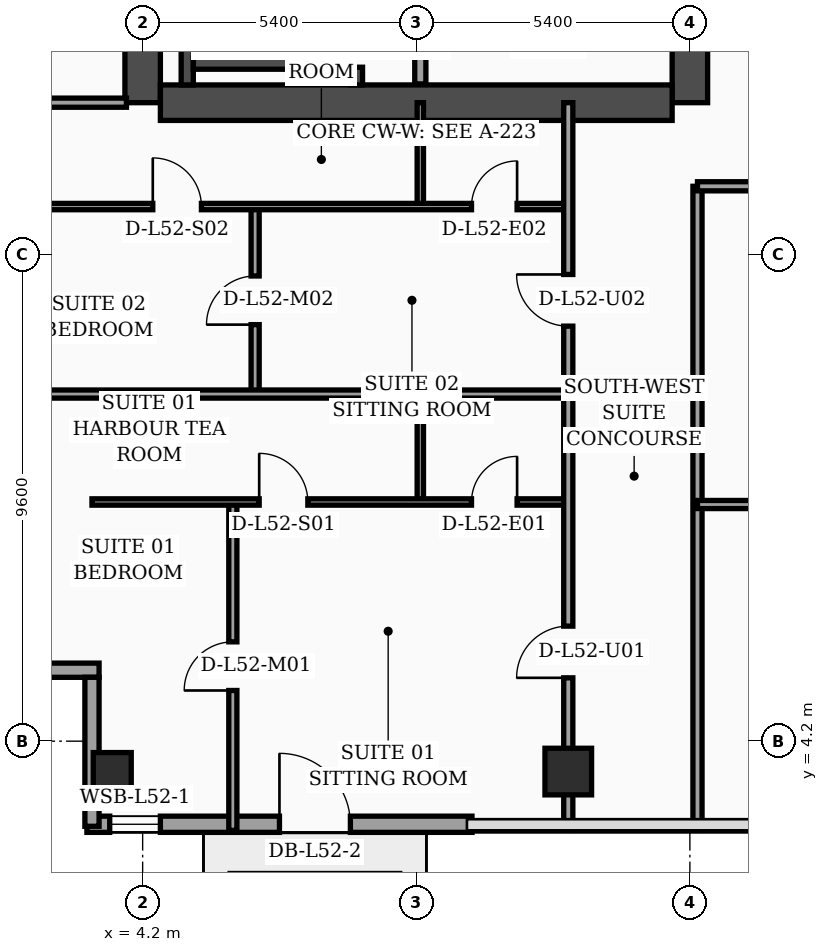
"""IFC4 building model, lengths in metres.
Left out: names, types, materials, properties, quantities, classifications, styles, units other than length and angle.
Written with IfcOpenShell. Run it as: python <this file> out.ifc"""

import sys

from ifc_helpers import new_model, si_unit, direction, frame, frame_2d, origin, origin_2d, place, context, subcontext, project, spatial, rectangle, hollow_rectangle, extrude, element, fill, save


model = new_model("IFC4")
c1 = context("Model", 3, precision=1e-05, world=origin(), true_north=direction((0.0, 1.0)))
c2 = subcontext(c1, "Body", "Model", "MODEL_VIEW")
j1 = project(units=[si_unit("LENGTHUNIT", "METRE"), si_unit("PLANEANGLEUNIT", "RADIAN")], contexts=[c1])
p1 = place(None, origin())
s1 = spatial("IfcSite", under=j1, at=p1, CompositionType="ELEMENT")
p2 = place(p1, origin())
s2 = spatial("IfcBuilding", under=s1, at=p2, CompositionType="ELEMENT")
p3 = place(p2, frame((0.0, 0.0, 211.0)))
s3 = spatial("IfcBuildingStorey", under=s2, at=p3, CompositionType="ELEMENT", Elevation=211.0)
p4 = place(p3, frame((4.2, 16.8, 0.0), z_axis=(0.0, 0.0, 1.0), x_axis=(0.0, 1.0, 0.0)))
e1 = element("IfcWall", 1, at=p4, inside=s3, PredefinedType="SHEAR", context=c2, shape_type="SweptSolid", body=[
    extrude(rectangle(XDim=21.6, YDim=0.7, at=frame_2d((10.8, 0.0))), origin(), (0.0, 0.0, 1.0), 3.56),
])
p5 = place(p3, frame((15.0, 16.8, 0.0), z_axis=(0.0, 0.0, 1.0), x_axis=(0.0, 1.0, 0.0)))
e2 = element("IfcWall", 2, at=p5, inside=s3, PredefinedType="SHEAR", context=c2, shape_type="SweptSolid", body=[
    extrude(rectangle(XDim=21.6, YDim=0.7, at=frame_2d((10.8, 0.0))), origin(), (0.0, 0.0, 1.0), 3.56),
])
p6 = place(p5, frame((8.65, 0.0, 0.0)))
e3 = element("IfcOpeningElement", 3, at=p6, cuts=e2, PredefinedType="OPENING", context=c2, shape_type="SweptSolid", body=[
    extrude(rectangle(XDim=1.1, YDim=2.2, at=frame_2d((0.55, 1.1))), frame((0.0, 0.36, 0.0), z_axis=(0.0, -1.0, 0.0), x_axis=(1.0, 0.0, 0.0)), (0.0, 0.0, 1.0), 0.72),
])
p7 = place(p5, frame((10.85, 0.0, 0.0)))
e4 = element("IfcOpeningElement", 4, at=p7, cuts=e2, PredefinedType="OPENING", context=c2, shape_type="SweptSolid", body=[
    extrude(rectangle(XDim=1.1, YDim=2.2, at=frame_2d((0.55, 1.1))), frame((0.0, 0.36, 0.0), z_axis=(0.0, -1.0, 0.0), x_axis=(1.0, 0.0, 0.0)), (0.0, 0.0, 1.0), 0.72),
])
p8 = place(p5, frame((13.5, 0.0, 0.0)))
e5 = element("IfcOpeningElement", 5, at=p8, cuts=e2, PredefinedType="OPENING", context=c2, shape_type="SweptSolid", body=[
    extrude(rectangle(XDim=1.1, YDim=2.2, at=frame_2d((0.55, 1.1))), frame((0.0, 0.36, 0.0), z_axis=(0.0, -1.0, 0.0), x_axis=(1.0, 0.0, 0.0)), (0.0, 0.0, 1.0), 0.72),
])
p9 = place(p5, frame((16.15, 0.0, 0.0)))
e6 = element("IfcOpeningElement", 6, at=p9, cuts=e2, PredefinedType="OPENING", context=c2, shape_type="SweptSolid", body=[
    extrude(rectangle(XDim=1.1, YDim=2.2, at=frame_2d((0.55, 1.1))), frame((0.0, 0.36, 0.0), z_axis=(0.0, -1.0, 0.0), x_axis=(1.0, 0.0, 0.0)), (0.0, 0.0, 1.0), 0.72),
])
p10 = place(p3, frame((4.55, 16.8, 0.0), z_axis=(0.0, 0.0, 1.0), x_axis=(1.0, 0.0, 0.0)))
e7 = element("IfcWall", 7, at=p10, inside=s3, PredefinedType="SHEAR", context=c2, shape_type="SweptSolid", body=[
    extrude(rectangle(XDim=10.1, YDim=0.7, at=frame_2d((5.05, 0.0))), origin(), (0.0, 0.0, 1.0), 3.56),
])
p11 = place(p3, frame((5.08, 17.15, 0.0), z_axis=(0.0, 0.0, 1.0), x_axis=(0.0, 1.0, 0.0)))
e8 = element("IfcWall", 8, at=p11, inside=s3, PredefinedType="SOLIDWALL", context=c2, shape_type="SweptSolid", body=[
    extrude(rectangle(XDim=9.64, YDim=0.24, at=frame_2d((4.82, 0.0))), origin(), (0.0, 0.0, 1.0), 3.56),
])
p12 = place(p3, frame((8.42, 17.15, 0.0), z_axis=(0.0, 0.0, 1.0), x_axis=(0.0, 1.0, 0.0)))
e9 = element("IfcWall", 9, at=p12, inside=s3, PredefinedType="SOLIDWALL", context=c2, shape_type="SweptSolid", body=[
    extrude(rectangle(XDim=9.64, YDim=0.24, at=frame_2d((4.82, 0.0))), origin(), (0.0, 0.0, 1.0), 3.56),
])
p13 = place(p12, frame((0.35, 0.0, 0.0)))
e10 = element("IfcOpeningElement", 10, at=p13, cuts=e9, PredefinedType="OPENING", context=c2, shape_type="SweptSolid", body=[
    extrude(rectangle(XDim=1.15, YDim=2.2, at=frame_2d((0.575, 1.1))), frame((0.0, 0.13, 0.0), z_axis=(0.0, -1.0, 0.0), x_axis=(1.0, 0.0, 0.0)), (0.0, 0.0, 1.0), 0.26),
])
p14 = place(p3, frame((5.2, 17.58, 0.0), z_axis=(0.0, 0.0, 1.0), x_axis=(1.0, 0.0, 0.0)))
e11 = element("IfcWall", 11, at=p14, inside=s3, PredefinedType="SOLIDWALL", context=c2, shape_type="SweptSolid", body=[
    extrude(rectangle(XDim=3.1, YDim=0.24, at=frame_2d((1.55, 0.0))), origin(), (0.0, 0.0, 1.0), 3.56),
])
p15 = place(p3, frame((3.6, 3.6, 0.0), z_axis=(0.0, 0.0, 1.0), x_axis=(1.0, 0.0, 0.0)))
e12 = element("IfcColumn", 12, at=p15, inside=s3, PredefinedType="COLUMN", context=c2, shape_type="SweptSolid", body=[
    extrude(hollow_rectangle(XDim=0.75, YDim=0.75, WallThickness=0.032, at=origin_2d()), origin(), (0.0, 0.0, 1.0), 3.56),
])
p16 = place(p3, frame((12.6, 3.6, 0.0), z_axis=(0.0, 0.0, 1.0), x_axis=(1.0, 0.0, 0.0)))
e13 = element("IfcColumn", 13, at=p16, inside=s3, PredefinedType="COLUMN", context=c2, shape_type="SweptSolid", body=[
    extrude(rectangle(XDim=0.92, YDim=0.92, at=origin_2d()), origin(), (0.0, 0.0, 1.0), 3.56),
])
p17 = place(p3, frame((3.1, 2.56, 0.0), z_axis=(0.0, 0.0, 1.0), x_axis=(1.0, 0.0, 0.0)))
e14 = element("IfcWall", 14, at=p17, inside=s3, PredefinedType="SOLIDWALL", context=c2, shape_type="SweptSolid", body=[
    extrude(rectangle(XDim=7.6, YDim=0.32, at=frame_2d((3.8, 0.0))), origin(), (0.0, 0.0, 1.0), 3.56),
])
p18 = place(p17, frame((0.45, 0.0, 0.75)))
e15 = element("IfcOpeningElement", 15, at=p18, cuts=e14, PredefinedType="OPENING", context=c2, shape_type="SweptSolid", body=[
    extrude(rectangle(XDim=1.0, YDim=1.6, at=frame_2d((0.5, 0.8))), frame((0.0, 0.17, 0.0), z_axis=(0.0, -1.0, 0.0), x_axis=(1.0, 0.0, 0.0)), (0.0, 0.0, 1.0), 0.34),
])
p19 = place(p17, frame((3.8, 0.0, 0.0)))
e16 = element("IfcOpeningElement", 16, at=p19, cuts=e14, PredefinedType="OPENING", context=c2, shape_type="SweptSolid", body=[
    extrude(rectangle(XDim=1.4, YDim=2.25, at=frame_2d((0.7, 1.125))), frame((0.0, 0.17, 0.0), z_axis=(0.0, -1.0, 0.0), x_axis=(1.0, 0.0, 0.0)), (0.0, 0.0, 1.0), 0.34),
])
p20 = place(p3, frame((0.12, 5.6, 0.0), z_axis=(0.0, 0.0, 1.0), x_axis=(1.0, 0.0, 0.0)))
e17 = element("IfcWall", 17, at=p20, inside=s3, PredefinedType="SOLIDWALL", context=c2, shape_type="SweptSolid", body=[
    extrude(rectangle(XDim=3.22, YDim=0.28, at=frame_2d((1.61, 0.0))), origin(), (0.0, 0.0, 1.0), 2.94),
])
p21 = place(p3, frame((3.2, 5.46, 0.0), z_axis=(0.0, 0.0, 1.0), x_axis=(0.0, -1.0, 0.0)))
e18 = element("IfcWall", 18, at=p21, inside=s3, PredefinedType="SOLIDWALL", context=c2, shape_type="SweptSolid", body=[
    extrude(rectangle(XDim=2.94, YDim=0.28, at=frame_2d((1.47, 0.0))), origin(), (0.0, 0.0, 1.0), 2.94),
])
p22 = place(p3, frame((9.68, 17.17, 0.0), z_axis=(0.0, 0.0, 1.0), x_axis=(0.0, 1.0, 0.0)))
e19 = element("IfcWall", 19, at=p22, inside=s3, PredefinedType="SOLIDWALL", context=c2, shape_type="SweptSolid", body=[
    extrude(rectangle(XDim=7.83, YDim=0.22, at=frame_2d((3.915, 0.0))), origin(), (0.0, 0.0, 1.0), 3.56),
])
p23 = place(p3, frame((0.08, 16.8, 0.0), z_axis=(0.0, 0.0, 1.0), x_axis=(1.0, 0.0, 0.0)))
e20 = element("IfcWall", 20, at=p23, inside=s3, PredefinedType="PARTITIONING", context=c2, shape_type="SweptSolid", body=[
    extrude(rectangle(XDim=3.8, YDim=0.18, at=frame_2d((1.9, 0.0))), origin(), (0.0, 0.0, 1.0), 2.94),
])
p24 = place(p3, frame((9.68, 8.92, 0.0), z_axis=(0.0, 0.0, 1.0), x_axis=(0.0, 1.0, 0.0)))
e21 = element("IfcWall", 21, at=p24, inside=s3, PredefinedType="PARTITIONING", context=c2, shape_type="SweptSolid", body=[
    extrude(rectangle(XDim=2.13, YDim=0.125, at=frame_2d((1.065, 0.0))), origin(), (0.0, 0.0, 1.0), 3.09),
])
p25 = place(p3, frame((5.98, 2.44, 0.0), z_axis=(0.0, 0.0, 1.0), x_axis=(0.0, 1.0, 0.0)))
e22 = element("IfcWall", 22, at=p25, inside=s3, PredefinedType="PARTITIONING", context=c2, shape_type="SweptSolid", body=[
    extrude(rectangle(XDim=6.48, YDim=0.16, at=frame_2d((3.24, 0.0))), origin(), (0.0, 0.0, 1.0), 3.09),
])
p26 = place(p25, frame((2.76, 0.0, 0.0)))
e23 = element("IfcOpeningElement", 23, at=p26, cuts=e22, PredefinedType="OPENING", context=c2, shape_type="SweptSolid", body=[
    extrude(rectangle(XDim=0.96, YDim=2.2, at=frame_2d((0.48, 1.1))), frame((0.0, 0.09, 0.0), z_axis=(0.0, -1.0, 0.0), x_axis=(1.0, 0.0, 0.0)), (0.0, 0.0, 1.0), 0.18),
])
p27 = place(p3, frame((3.2, 8.92, 0.0), z_axis=(0.0, 0.0, 1.0), x_axis=(1.0, 0.0, 0.0)))
e24 = element("IfcWall", 24, at=p27, inside=s3, PredefinedType="PARTITIONING", context=c2, shape_type="SweptSolid", body=[
    extrude(rectangle(XDim=9.4, YDim=0.125, at=frame_2d((4.7, 0.0))), origin(), (0.0, 0.0, 1.0), 2.94),
])
p28 = place(p27, frame((3.3, 0.0, 0.0)))
e25 = element("IfcOpeningElement", 25, at=p28, cuts=e24, PredefinedType="OPENING", context=c2, shape_type="SweptSolid", body=[
    extrude(rectangle(XDim=0.96, YDim=2.2, at=frame_2d((0.48, 1.1))), frame((0.0, 0.073, 0.0), z_axis=(0.0, -1.0, 0.0), x_axis=(1.0, 0.0, 0.0)), (0.0, 0.0, 1.0), 0.145),
])
p29 = place(p27, frame((7.49, 0.0, 0.0)))
e26 = element("IfcOpeningElement", 26, at=p29, cuts=e24, PredefinedType="OPENING", context=c2, shape_type="SweptSolid", body=[
    extrude(rectangle(XDim=0.9, YDim=2.15, at=frame_2d((0.45, 1.075))), frame((0.0, 0.073, 0.0), z_axis=(0.0, -1.0, 0.0), x_axis=(1.0, 0.0, 0.0)), (0.0, 0.0, 1.0), 0.145),
])
p30 = place(p3, frame((9.68, 14.75, 0.0), z_axis=(0.0, 0.0, 1.0), x_axis=(0.0, 1.0, 0.0)))
e27 = element("IfcWall", 27, at=p30, inside=s3, PredefinedType="PARTITIONING", context=c2, shape_type="SweptSolid", body=[
    extrude(rectangle(XDim=2.05, YDim=0.125, at=frame_2d((1.025, 0.0))), origin(), (0.0, 0.0, 1.0), 3.56),
])
p31 = place(p3, frame((6.42, 11.05, 0.0), z_axis=(0.0, 0.0, 1.0), x_axis=(0.0, 1.0, 0.0)))
e28 = element("IfcWall", 28, at=p31, inside=s3, PredefinedType="PARTITIONING", context=c2, shape_type="SweptSolid", body=[
    extrude(rectangle(XDim=3.7, YDim=0.16, at=frame_2d((1.85, 0.0))), origin(), (0.0, 0.0, 1.0), 3.56),
])
p32 = place(p31, frame((1.37, 0.0, 0.0)))
e29 = element("IfcOpeningElement", 29, at=p32, cuts=e28, PredefinedType="OPENING", context=c2, shape_type="SweptSolid", body=[
    extrude(rectangle(XDim=0.96, YDim=2.2, at=frame_2d((0.48, 1.1))), frame((0.0, 0.09, 0.0), z_axis=(0.0, -1.0, 0.0), x_axis=(1.0, 0.0, 0.0)), (0.0, 0.0, 1.0), 0.18),
])
p33 = place(p3, frame((0.08, 14.75, 0.0), z_axis=(0.0, 0.0, 1.0), x_axis=(1.0, 0.0, 0.0)))
e30 = element("IfcWall", 30, at=p33, inside=s3, PredefinedType="PARTITIONING", context=c2, shape_type="SweptSolid", body=[
    extrude(rectangle(XDim=12.52, YDim=0.125, at=frame_2d((6.26, 0.0))), origin(), (0.0, 0.0, 1.0), 2.94),
])
p34 = place(p33, frame((4.32, 0.0, 0.0)))
e31 = element("IfcOpeningElement", 31, at=p34, cuts=e30, PredefinedType="OPENING", context=c2, shape_type="SweptSolid", body=[
    extrude(rectangle(XDim=0.96, YDim=2.2, at=frame_2d((0.48, 1.1))), frame((0.0, 0.073, 0.0), z_axis=(0.0, -1.0, 0.0), x_axis=(1.0, 0.0, 0.0)), (0.0, 0.0, 1.0), 0.145),
])
p35 = place(p33, frame((10.61, 0.0, 0.0)))
e32 = element("IfcOpeningElement", 32, at=p35, cuts=e30, PredefinedType="OPENING", context=c2, shape_type="SweptSolid", body=[
    extrude(rectangle(XDim=0.9, YDim=2.15, at=frame_2d((0.45, 1.075))), frame((0.0, 0.073, 0.0), z_axis=(0.0, -1.0, 0.0), x_axis=(1.0, 0.0, 0.0)), (0.0, 0.0, 1.0), 0.145),
])
p36 = place(p3, frame((0.08, 11.05, 0.0), z_axis=(0.0, 0.0, 1.0), x_axis=(1.0, 0.0, 0.0)))
e33 = element("IfcWall", 33, at=p36, inside=s3, PredefinedType="PARTITIONING", context=c2, shape_type="SweptSolid", body=[
    extrude(rectangle(XDim=12.52, YDim=0.16, at=frame_2d((6.26, 0.0))), origin(), (0.0, 0.0, 1.0), 2.94),
])
p37 = place(p3, frame((12.6, 2.44, 0.0), z_axis=(0.0, 0.0, 1.0), x_axis=(0.0, 1.0, 0.0)))
e34 = element("IfcWall", 34, at=p37, inside=s3, PredefinedType="PARTITIONING", context=c2, shape_type="SweptSolid", body=[
    extrude(rectangle(XDim=14.36, YDim=0.18, at=frame_2d((7.18, 0.0))), origin(), (0.0, 0.0, 1.0), 2.94),
])
p38 = place(p37, frame((3.01, 0.0, 0.0)))
e35 = element("IfcOpeningElement", 35, at=p38, cuts=e34, PredefinedType="OPENING", context=c2, shape_type="SweptSolid", body=[
    extrude(rectangle(XDim=1.02, YDim=2.2, at=frame_2d((0.51, 1.1))), frame((0.0, 0.1, 0.0), z_axis=(0.0, -1.0, 0.0), x_axis=(1.0, 0.0, 0.0)), (0.0, 0.0, 1.0), 0.2),
])
p39 = place(p37, frame((9.95, 0.0, 0.0)))
e36 = element("IfcOpeningElement", 36, at=p39, cuts=e34, PredefinedType="OPENING", context=c2, shape_type="SweptSolid", body=[
    extrude(rectangle(XDim=1.02, YDim=2.2, at=frame_2d((0.51, 1.1))), frame((0.0, 0.1, 0.0), z_axis=(0.0, -1.0, 0.0), x_axis=(1.0, 0.0, 0.0)), (0.0, 0.0, 1.0), 0.2),
])
p40 = place(p3, frame((15.15, 2.44, 0.0), z_axis=(0.0, 0.0, 1.0), x_axis=(0.0, 1.0, 0.0)))
e37 = element("IfcWall", 37, at=p40, inside=s3, PredefinedType="PARTITIONING", context=c2, shape_type="SweptSolid", body=[
    extrude(rectangle(XDim=12.71, YDim=0.18, at=frame_2d((6.355, 0.0))), origin(), (0.0, 0.0, 1.0), 3.09),
])
p41 = place(p3, frame((15.15, 8.87, 0.0), z_axis=(0.0, 0.0, 1.0), x_axis=(1.0, 0.0, 0.0)))
e38 = element("IfcWall", 38, at=p41, inside=s3, PredefinedType="PARTITIONING", context=c2, shape_type="SweptSolid", body=[
    extrude(rectangle(XDim=4.45, YDim=0.16, at=frame_2d((2.225, 0.0))), origin(), (0.0, 0.0, 1.0), 3.56),
])
p42 = place(p41, frame((1.75, 0.0, 0.0)))
e39 = element("IfcOpeningElement", 39, at=p42, cuts=e38, PredefinedType="OPENING", context=c2, shape_type="SweptSolid", body=[
    extrude(rectangle(XDim=0.96, YDim=2.2, at=frame_2d((0.48, 1.1))), frame((0.0, 0.09, 0.0), z_axis=(0.0, -1.0, 0.0), x_axis=(1.0, 0.0, 0.0)), (0.0, 0.0, 1.0), 0.18),
])
p43 = place(p3, frame((15.15, 15.15, 0.0), z_axis=(0.0, 0.0, 1.0), x_axis=(1.0, 0.0, 0.0)))
e40 = element("IfcWall", 40, at=p43, inside=s3, PredefinedType="PARTITIONING", context=c2, shape_type="SweptSolid", body=[
    extrude(rectangle(XDim=6.45, YDim=0.18, at=frame_2d((3.225, 0.0))), origin(), (0.0, 0.0, 1.0), 2.59),
])
p44 = place(p43, frame((1.74, 0.0, 0.0)))
e41 = element("IfcOpeningElement", 41, at=p44, cuts=e40, PredefinedType="OPENING", context=c2, shape_type="SweptSolid", body=[
    extrude(rectangle(XDim=1.02, YDim=2.2, at=frame_2d((0.51, 1.1))), frame((0.0, 0.1, 0.0), z_axis=(0.0, -1.0, 0.0), x_axis=(1.0, 0.0, 0.0)), (0.0, 0.0, 1.0), 0.2),
])
p45 = place(p18, origin())
e42 = element("IfcWindow", 42, at=p45, inside=s3, PartitioningType="SINGLE_PANEL", PredefinedType="WINDOW", context=c2, shape_type="SweptSolid", body=[
    extrude(rectangle(XDim=1.0, YDim=1.6, at=frame_2d((0.5, 0.8))), frame((0.0, 0.03, 0.0), z_axis=(0.0, -1.0, 0.0), x_axis=(1.0, 0.0, 0.0)), (0.0, 0.0, 1.0), 0.06),
])
fill(e15, e42)
p46 = place(p19, origin())
e43 = element("IfcDoor", 43, at=p46, inside=s3, OperationType="SINGLE_SWING_LEFT", PredefinedType="DOOR", context=c2, shape_type="SweptSolid", body=[
    extrude(rectangle(XDim=1.4, YDim=2.25, at=frame_2d((0.7, 1.125))), frame((0.0, 0.025, 0.0), z_axis=(0.0, -1.0, 0.0), x_axis=(1.0, 0.0, 0.0)), (0.0, 0.0, 1.0), 0.05),
])
fill(e16, e43)
p47 = place(p26, origin())
e44 = element("IfcDoor", 44, at=p47, inside=s3, OperationType="SINGLE_SWING_LEFT", PredefinedType="DOOR", context=c2, shape_type="SweptSolid", body=[
    extrude(rectangle(XDim=0.96, YDim=2.2, at=frame_2d((0.48, 1.1))), frame((0.0, 0.025, 0.0), z_axis=(0.0, -1.0, 0.0), x_axis=(1.0, 0.0, 0.0)), (0.0, 0.0, 1.0), 0.05),
])
fill(e23, e44)
p48 = place(p28, origin())
e45 = element("IfcDoor", 45, at=p48, inside=s3, OperationType="SINGLE_SWING_LEFT", PredefinedType="DOOR", context=c2, shape_type="SweptSolid", body=[
    extrude(rectangle(XDim=0.96, YDim=2.2, at=frame_2d((0.48, 1.1))), frame((0.0, 0.025, 0.0), z_axis=(0.0, -1.0, 0.0), x_axis=(1.0, 0.0, 0.0)), (0.0, 0.0, 1.0), 0.05),
])
fill(e25, e45)
p49 = place(p29, origin())
e46 = element("IfcDoor", 46, at=p49, inside=s3, OperationType="SINGLE_SWING_RIGHT", PredefinedType="DOOR", context=c2, shape_type="SweptSolid", body=[
    extrude(rectangle(XDim=0.9, YDim=2.15, at=frame_2d((0.45, 1.075))), frame((0.0, 0.025, 0.0), z_axis=(0.0, -1.0, 0.0), x_axis=(1.0, 0.0, 0.0)), (0.0, 0.0, 1.0), 0.05),
])
fill(e26, e46)
p50 = place(p32, origin())
e47 = element("IfcDoor", 47, at=p50, inside=s3, OperationType="SINGLE_SWING_LEFT", PredefinedType="DOOR", context=c2, shape_type="SweptSolid", body=[
    extrude(rectangle(XDim=0.96, YDim=2.2, at=frame_2d((0.48, 1.1))), frame((0.0, 0.025, 0.0), z_axis=(0.0, -1.0, 0.0), x_axis=(1.0, 0.0, 0.0)), (0.0, 0.0, 1.0), 0.05),
])
fill(e29, e47)
p51 = place(p34, origin())
e48 = element("IfcDoor", 48, at=p51, inside=s3, OperationType="SINGLE_SWING_LEFT", PredefinedType="DOOR", context=c2, shape_type="SweptSolid", body=[
    extrude(rectangle(XDim=0.96, YDim=2.2, at=frame_2d((0.48, 1.1))), frame((0.0, 0.025, 0.0), z_axis=(0.0, -1.0, 0.0), x_axis=(1.0, 0.0, 0.0)), (0.0, 0.0, 1.0), 0.05),
])
fill(e31, e48)
p52 = place(p35, origin())
e49 = element("IfcDoor", 49, at=p52, inside=s3, OperationType="SINGLE_SWING_RIGHT", PredefinedType="DOOR", context=c2, shape_type="SweptSolid", body=[
    extrude(rectangle(XDim=0.9, YDim=2.15, at=frame_2d((0.45, 1.075))), frame((0.0, 0.025, 0.0), z_axis=(0.0, -1.0, 0.0), x_axis=(1.0, 0.0, 0.0)), (0.0, 0.0, 1.0), 0.05),
])
fill(e32, e49)
p53 = place(p38, origin())
e50 = element("IfcDoor", 50, at=p53, inside=s3, OperationType="SINGLE_SWING_LEFT", PredefinedType="DOOR", context=c2, shape_type="SweptSolid", body=[
    extrude(rectangle(XDim=1.02, YDim=2.2, at=frame_2d((0.51, 1.1))), frame((0.0, 0.025, 0.0), z_axis=(0.0, -1.0, 0.0), x_axis=(1.0, 0.0, 0.0)), (0.0, 0.0, 1.0), 0.05),
])
fill(e35, e50)
p54 = place(p39, origin())
e51 = element("IfcDoor", 51, at=p54, inside=s3, OperationType="SINGLE_SWING_RIGHT", PredefinedType="DOOR", context=c2, shape_type="SweptSolid", body=[
    extrude(rectangle(XDim=1.02, YDim=2.2, at=frame_2d((0.51, 1.1))), frame((0.0, 0.025, 0.0), z_axis=(0.0, -1.0, 0.0), x_axis=(1.0, 0.0, 0.0)), (0.0, 0.0, 1.0), 0.05),
])
fill(e36, e51)
p55 = place(p13, origin())
e52 = element("IfcDoor", 52, at=p55, inside=s3, OperationType="SINGLE_SWING_LEFT", PredefinedType="DOOR", context=c2, shape_type="SweptSolid", body=[
    extrude(rectangle(XDim=1.15, YDim=2.2, at=frame_2d((0.575, 1.1))), frame((0.0, 0.025, 0.0), z_axis=(0.0, -1.0, 0.0), x_axis=(1.0, 0.0, 0.0)), (0.0, 0.0, 1.0), 0.05),
])
fill(e10, e52)
save(model, sys.argv[1])
